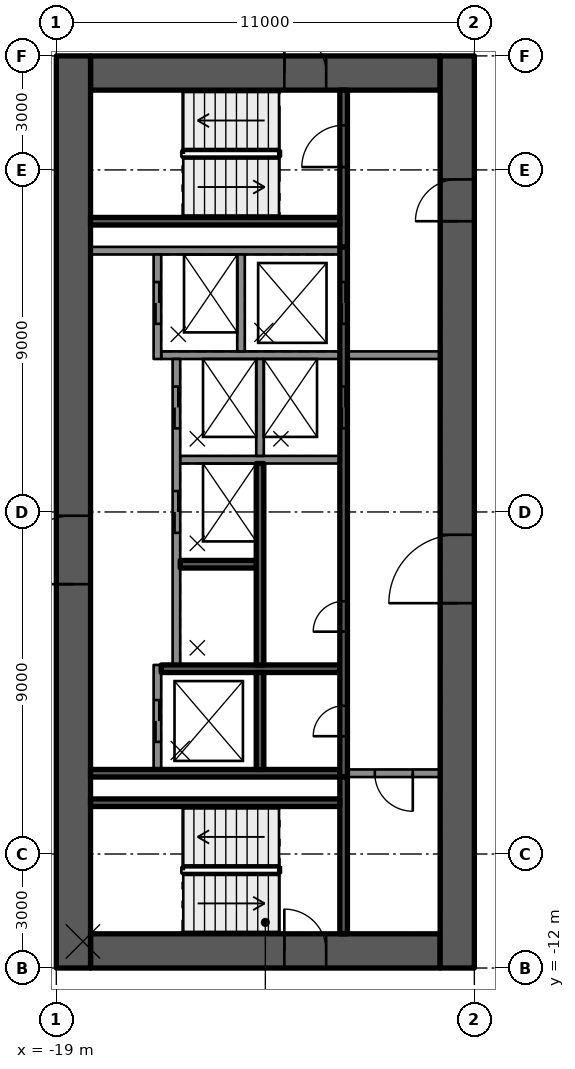
"""IFC4 building model, lengths in metres.
Left out: names, types, materials, properties, quantities, classifications, styles, units other than length and angle.
Written with IfcOpenShell. Run it as: python <this file> out.ifc"""

import sys

from ifc_helpers import new_model, si_unit, direction, frame, frame_2d, origin, place, context, subcontext, project, spatial, rectangle, extrude, element, fill, save


model = new_model("IFC4")
c1 = context("Model", 3, precision=1e-05, world=origin(), true_north=direction((0.0, 1.0)))
c2 = subcontext(c1, "Body", "Model", "MODEL_VIEW")
j1 = project(units=[si_unit("LENGTHUNIT", "METRE"), si_unit("PLANEANGLEUNIT", "RADIAN")], contexts=[c1])
p1 = place(None, origin())
s1 = spatial("IfcSite", under=j1, at=p1, CompositionType="ELEMENT")
p2 = place(p1, origin())
s2 = spatial("IfcBuilding", under=s1, at=p2, CompositionType="ELEMENT")
p3 = place(p2, frame((0.0, 0.0, 199.1)))
s3 = spatial("IfcBuildingStorey", under=s2, at=p3, CompositionType="ELEMENT", Elevation=199.1)
p4 = place(p3, frame((-18.1, 11.55, 0.0), z_axis=(0.0, 0.0, 1.0), x_axis=(1.0, 0.0, 0.0)))
e1 = element("IfcWall", 1, at=p4, inside=s3, PredefinedType="SHEAR", context=c2, shape_type="SweptSolid", body=[
    extrude(rectangle(XDim=9.2, YDim=0.9, at=frame_2d((4.6, 0.0))), origin(), (0.0, 0.0, 1.0), 3.5),
])
p5 = place(p4, frame((5.1, 0.0, 0.0)))
e2 = element("IfcOpeningElement", 2, at=p5, cuts=e1, PredefinedType="OPENING", context=c2, shape_type="SweptSolid", body=[
    extrude(rectangle(XDim=1.1, YDim=2.1, at=frame_2d((0.55, 1.05))), frame((0.0, 0.46, 0.0), z_axis=(0.0, -1.0, 0.0), x_axis=(1.0, 0.0, 0.0)), (0.0, 0.0, 1.0), 0.92),
])
p6 = place(p3, frame((-18.1, -11.55, 0.0), z_axis=(0.0, 0.0, 1.0), x_axis=(1.0, 0.0, 0.0)))
e3 = element("IfcWall", 3, at=p6, inside=s3, PredefinedType="SHEAR", context=c2, shape_type="SweptSolid", body=[
    extrude(rectangle(XDim=9.2, YDim=0.9, at=frame_2d((4.6, 0.0))), origin(), (0.0, 0.0, 1.0), 3.5),
])
p7 = place(p6, frame((5.1, 0.0, 0.0)))
e4 = element("IfcOpeningElement", 4, at=p7, cuts=e3, PredefinedType="OPENING", context=c2, shape_type="SweptSolid", body=[
    extrude(rectangle(XDim=1.1, YDim=2.1, at=frame_2d((0.55, 1.05))), frame((0.0, 0.46, 0.0), z_axis=(0.0, -1.0, 0.0), x_axis=(1.0, 0.0, 0.0)), (0.0, 0.0, 1.0), 0.92),
])
p8 = place(p3, frame((-18.55, -12.0, 0.0), z_axis=(0.0, 0.0, 1.0), x_axis=(0.0, 1.0, 0.0)))
e5 = element("IfcWall", 5, at=p8, inside=s3, PredefinedType="SHEAR", context=c2, shape_type="SweptSolid", body=[
    extrude(rectangle(XDim=24.0, YDim=0.9, at=frame_2d((12.0, 0.0))), origin(), (0.0, 0.0, 1.0), 3.5),
])
p9 = place(p8, frame((10.1, 0.0, 0.0)))
e6 = element("IfcOpeningElement", 6, at=p9, cuts=e5, PredefinedType="OPENING", context=c2, shape_type="SweptSolid", body=[
    extrude(rectangle(XDim=1.8, YDim=2.1, at=frame_2d((0.9, 1.05))), frame((0.0, 0.46, 0.0), z_axis=(0.0, -1.0, 0.0), x_axis=(1.0, 0.0, 0.0)), (0.0, 0.0, 1.0), 0.92),
])
p10 = place(p3, frame((-8.45, -12.0, 0.0), z_axis=(0.0, 0.0, 1.0), x_axis=(0.0, 1.0, 0.0)))
e7 = element("IfcWall", 7, at=p10, inside=s3, PredefinedType="SHEAR", context=c2, shape_type="SweptSolid", body=[
    extrude(rectangle(XDim=24.0, YDim=0.9, at=frame_2d((12.0, 0.0))), origin(), (0.0, 0.0, 1.0), 3.5),
])
p11 = place(p10, frame((9.6, 0.0, 0.0)))
e8 = element("IfcOpeningElement", 8, at=p11, cuts=e7, PredefinedType="OPENING", context=c2, shape_type="SweptSolid", body=[
    extrude(rectangle(XDim=1.8, YDim=2.1, at=frame_2d((0.9, 1.05))), frame((0.0, 0.46, 0.0), z_axis=(0.0, -1.0, 0.0), x_axis=(1.0, 0.0, 0.0)), (0.0, 0.0, 1.0), 0.92),
])
p12 = place(p10, frame((19.65, 0.0, 0.0)))
e9 = element("IfcOpeningElement", 9, at=p12, cuts=e7, PredefinedType="OPENING", context=c2, shape_type="SweptSolid", body=[
    extrude(rectangle(XDim=1.1, YDim=2.1, at=frame_2d((0.55, 1.05))), frame((0.0, 0.46, 0.0), z_axis=(0.0, -1.0, 0.0), x_axis=(1.0, 0.0, 0.0)), (0.0, 0.0, 1.0), 0.92),
])
for number, where, z_axis, x_axis in (
    (10, (-11.54, 6.875, 0.0), (0.0, 0.0, 1.0), (-1.0, 0.0, 0.0)),
    (11, (-11.54, -6.875, 0.0), (0.0, 0.0, 1.0), (-1.0, 0.0, 0.0)),
):
    element("IfcWall", number, at=place(p3, frame(where, z_axis=z_axis, x_axis=x_axis)), inside=s3, PredefinedType="SOLIDWALL", context=c2, shape_type="SweptSolid", body=[
        extrude(rectangle(XDim=6.56, YDim=0.2, at=frame_2d((3.28, 0.0))), origin(), (0.0, 0.0, 1.0), 3.08),
    ])
p13 = place(p3, frame((-11.54, -4.125, 0.0), z_axis=(0.0, 0.0, 1.0), x_axis=(-1.0, 0.0, 0.0)))
e12 = element("IfcWall", 12, at=p13, inside=s3, PredefinedType="SOLIDWALL", context=c2, shape_type="SweptSolid", body=[
    extrude(rectangle(XDim=4.7, YDim=0.2, at=frame_2d((2.35, 0.0))), origin(), (0.0, 0.0, 1.0), 3.08),
])
p14 = place(p3, frame((-13.74, -1.375, 0.0), z_axis=(0.0, 0.0, 1.0), x_axis=(-1.0, 0.0, 0.0)))
e13 = element("IfcWall", 13, at=p14, inside=s3, PredefinedType="SOLIDWALL", context=c2, shape_type="SweptSolid", body=[
    extrude(rectangle(XDim=2.0, YDim=0.2, at=frame_2d((1.0, 0.0))), origin(), (0.0, 0.0, 1.0), 3.08),
])
p15 = place(p3, frame((-11.54, 1.375, 0.0), z_axis=(0.0, 0.0, 1.0), x_axis=(-1.0, 0.0, 0.0)))
e14 = element("IfcWall", 14, at=p15, inside=s3, PredefinedType="SOLIDWALL", context=c2, shape_type="SweptSolid", body=[
    extrude(rectangle(XDim=4.2, YDim=0.2, at=frame_2d((2.1, 0.0))), origin(), (0.0, 0.0, 1.0), 3.08),
])
p16 = place(p3, frame((-11.54, 4.125, 0.0), z_axis=(0.0, 0.0, 1.0), x_axis=(-1.0, 0.0, 0.0)))
e15 = element("IfcWall", 15, at=p16, inside=s3, PredefinedType="SOLIDWALL", context=c2, shape_type="SweptSolid", body=[
    extrude(rectangle(XDim=4.7, YDim=0.2, at=frame_2d((2.35, 0.0))), origin(), (0.0, 0.0, 1.0), 3.08),
])
p17 = place(p3, frame((-11.44, -6.975, 0.0), z_axis=(0.0, 0.0, 1.0), x_axis=(0.0, 1.0, 0.0)))
e16 = element("IfcWall", 16, at=p17, inside=s3, PredefinedType="SOLIDWALL", context=c2, shape_type="SweptSolid", body=[
    extrude(rectangle(XDim=13.95, YDim=0.2, at=frame_2d((6.975, 0.0))), origin(), (0.0, 0.0, 1.0), 3.08),
])
p18 = place(p17, frame((9.175, 0.0, 0.0)))
e17 = element("IfcOpeningElement", 17, at=p18, cuts=e16, PredefinedType="OPENING", context=c2, shape_type="SweptSolid", body=[
    extrude(rectangle(XDim=1.1, YDim=2.1, at=frame_2d((0.55, 1.05))), frame((0.0, 0.11, 0.0), z_axis=(0.0, -1.0, 0.0), x_axis=(1.0, 0.0, 0.0)), (0.0, 0.0, 1.0), 0.22),
])
p19 = place(p17, frame((11.925, 0.0, 0.0)))
e18 = element("IfcOpeningElement", 18, at=p19, cuts=e16, PredefinedType="OPENING", context=c2, shape_type="SweptSolid", body=[
    extrude(rectangle(XDim=1.1, YDim=2.1, at=frame_2d((0.55, 1.05))), frame((0.0, 0.11, 0.0), z_axis=(0.0, -1.0, 0.0), x_axis=(1.0, 0.0, 0.0)), (0.0, 0.0, 1.0), 0.22),
])
p20 = place(p17, frame((1.075, 0.0, 0.0)))
e19 = element("IfcOpeningElement", 19, at=p20, cuts=e16, PredefinedType="OPENING", context=c2, shape_type="SweptSolid", body=[
    extrude(rectangle(XDim=0.8, YDim=2.1, at=frame_2d((0.4, 1.05))), frame((0.0, 0.11, 0.0), z_axis=(0.0, -1.0, 0.0), x_axis=(1.0, 0.0, 0.0)), (0.0, 0.0, 1.0), 0.22),
])
p21 = place(p17, frame((3.825, 0.0, 0.0)))
e20 = element("IfcOpeningElement", 20, at=p21, cuts=e16, PredefinedType="OPENING", context=c2, shape_type="SweptSolid", body=[
    extrude(rectangle(XDim=0.8, YDim=2.1, at=frame_2d((0.4, 1.05))), frame((0.0, 0.11, 0.0), z_axis=(0.0, -1.0, 0.0), x_axis=(1.0, 0.0, 0.0)), (0.0, 0.0, 1.0), 0.22),
])
p22 = place(p3, frame((-13.64, -6.775, 0.0), z_axis=(0.0, 0.0, 1.0), x_axis=(0.0, 1.0, 0.0)))
e21 = element("IfcWall", 21, at=p22, inside=s3, PredefinedType="SOLIDWALL", context=c2, shape_type="SweptSolid", body=[
    extrude(rectangle(XDim=2.55, YDim=0.2, at=frame_2d((1.275, 0.0))), origin(), (0.0, 0.0, 1.0), 3.08),
])
p23 = place(p3, frame((-13.64, -4.025, 0.0), z_axis=(0.0, 0.0, 1.0), x_axis=(0.0, 1.0, 0.0)))
e22 = element("IfcWall", 22, at=p23, inside=s3, PredefinedType="SOLIDWALL", context=c2, shape_type="SweptSolid", body=[
    extrude(rectangle(XDim=5.3, YDim=0.2, at=frame_2d((2.65, 0.0))), origin(), (0.0, 0.0, 1.0), 3.08),
])
for number, where, z_axis, x_axis in (
    (23, (-13.64, 1.475, 0.0), (0.0, 0.0, 1.0), (0.0, 1.0, 0.0)),
    (24, (-14.14, 4.225, 0.0), (0.0, 0.0, 1.0), (0.0, 1.0, 0.0)),
):
    element("IfcWall", number, at=place(p3, frame(where, z_axis=z_axis, x_axis=x_axis)), inside=s3, PredefinedType="SOLIDWALL", context=c2, shape_type="SweptSolid", body=[
        extrude(rectangle(XDim=2.55, YDim=0.2, at=frame_2d((1.275, 0.0))), origin(), (0.0, 0.0, 1.0), 3.08),
    ])
p24 = place(p3, frame((-16.34, -6.775, 0.0), z_axis=(0.0, 0.0, 1.0), x_axis=(0.0, 1.0, 0.0)))
e25 = element("IfcWall", 25, at=p24, inside=s3, PredefinedType="SOLIDWALL", context=c2, shape_type="SweptSolid", body=[
    extrude(rectangle(XDim=2.75, YDim=0.2, at=frame_2d((1.375, 0.0))), origin(), (0.0, 0.0, 1.0), 3.08),
])
p25 = place(p24, frame((0.725, 0.0, 0.0)))
e26 = element("IfcOpeningElement", 26, at=p25, cuts=e25, PredefinedType="OPENING", context=c2, shape_type="SweptSolid", body=[
    extrude(rectangle(XDim=1.1, YDim=2.1, at=frame_2d((0.55, 1.05))), frame((0.0, 0.11, 0.0), z_axis=(0.0, -1.0, 0.0), x_axis=(1.0, 0.0, 0.0)), (0.0, 0.0, 1.0), 0.22),
])
p26 = place(p3, frame((-15.84, -4.025, 0.0), z_axis=(0.0, 0.0, 1.0), x_axis=(0.0, 1.0, 0.0)))
e27 = element("IfcWall", 27, at=p26, inside=s3, PredefinedType="SOLIDWALL", context=c2, shape_type="SweptSolid", body=[
    extrude(rectangle(XDim=8.05, YDim=0.2, at=frame_2d((4.025, 0.0))), origin(), (0.0, 0.0, 1.0), 3.08),
])
p27 = place(p26, frame((3.475, 0.0, 0.0)))
e28 = element("IfcOpeningElement", 28, at=p27, cuts=e27, PredefinedType="OPENING", context=c2, shape_type="SweptSolid", body=[
    extrude(rectangle(XDim=1.1, YDim=2.1, at=frame_2d((0.55, 1.05))), frame((0.0, 0.11, 0.0), z_axis=(0.0, -1.0, 0.0), x_axis=(1.0, 0.0, 0.0)), (0.0, 0.0, 1.0), 0.22),
])
p28 = place(p26, frame((6.225, 0.0, 0.0)))
e29 = element("IfcOpeningElement", 29, at=p28, cuts=e27, PredefinedType="OPENING", context=c2, shape_type="SweptSolid", body=[
    extrude(rectangle(XDim=1.1, YDim=2.1, at=frame_2d((0.55, 1.05))), frame((0.0, 0.11, 0.0), z_axis=(0.0, -1.0, 0.0), x_axis=(1.0, 0.0, 0.0)), (0.0, 0.0, 1.0), 0.22),
])
p29 = place(p3, frame((-16.34, 4.025, 0.0), z_axis=(0.0, 0.0, 1.0), x_axis=(0.0, 1.0, 0.0)))
e30 = element("IfcWall", 30, at=p29, inside=s3, PredefinedType="SOLIDWALL", context=c2, shape_type="SweptSolid", body=[
    extrude(rectangle(XDim=2.75, YDim=0.2, at=frame_2d((1.375, 0.0))), origin(), (0.0, 0.0, 1.0), 3.08),
])
p30 = place(p29, frame((0.925, 0.0, 0.0)))
e31 = element("IfcOpeningElement", 31, at=p30, cuts=e30, PredefinedType="OPENING", context=c2, shape_type="SweptSolid", body=[
    extrude(rectangle(XDim=1.1, YDim=2.1, at=frame_2d((0.55, 1.05))), frame((0.0, 0.11, 0.0), z_axis=(0.0, -1.0, 0.0), x_axis=(1.0, 0.0, 0.0)), (0.0, 0.0, 1.0), 0.22),
])
p31 = place(p3, frame((-11.44, 6.975, 0.0), z_axis=(0.0, 0.0, 1.0), x_axis=(0.0, 1.0, 0.0)))
e32 = element("IfcWall", 32, at=p31, inside=s3, PredefinedType="SOLIDWALL", context=c2, shape_type="SweptSolid", body=[
    extrude(rectangle(XDim=4.125, YDim=0.2, at=frame_2d((2.062, 0.0))), origin(), (0.0, 0.0, 1.0), 3.08),
])
p32 = place(p31, frame((2.1, 0.0, 0.0)))
e33 = element("IfcOpeningElement", 33, at=p32, cuts=e32, PredefinedType="OPENING", context=c2, shape_type="SweptSolid", body=[
    extrude(rectangle(XDim=1.1, YDim=2.1, at=frame_2d((0.55, 1.05))), frame((0.0, 0.11, 0.0), z_axis=(0.0, -1.0, 0.0), x_axis=(1.0, 0.0, 0.0)), (0.0, 0.0, 1.0), 0.22),
])
p33 = place(p3, frame((-11.54, 7.65, 0.0), z_axis=(0.0, 0.0, 1.0), x_axis=(-1.0, 0.0, 0.0)))
e34 = element("IfcWall", 34, at=p33, inside=s3, PredefinedType="SOLIDWALL", context=c2, shape_type="SweptSolid", body=[
    extrude(rectangle(XDim=6.56, YDim=0.2, at=frame_2d((3.28, 0.0))), origin(), (0.0, 0.0, 1.0), 3.08),
])
p34 = place(p3, frame((-11.44, -11.1, 0.0), z_axis=(0.0, 0.0, 1.0), x_axis=(0.0, 1.0, 0.0)))
e35 = element("IfcWall", 35, at=p34, inside=s3, PredefinedType="SOLIDWALL", context=c2, shape_type="SweptSolid", body=[
    extrude(rectangle(XDim=4.125, YDim=0.2, at=frame_2d((2.062, 0.0))), origin(), (0.0, 0.0, 1.0), 3.08),
])
p35 = place(p3, frame((-11.54, -7.65, 0.0), z_axis=(0.0, 0.0, 1.0), x_axis=(-1.0, 0.0, 0.0)))
e36 = element("IfcWall", 36, at=p35, inside=s3, PredefinedType="SOLIDWALL", context=c2, shape_type="SweptSolid", body=[
    extrude(rectangle(XDim=6.56, YDim=0.2, at=frame_2d((3.28, 0.0))), origin(), (0.0, 0.0, 1.0), 3.08),
])
p36 = place(p3, frame((-8.9, 4.125, 0.0), z_axis=(0.0, 0.0, 1.0), x_axis=(-1.0, 0.0, 0.0)))
e37 = element("IfcWall", 37, at=p36, inside=s3, PredefinedType="PARTITIONING", context=c2, shape_type="SweptSolid", body=[
    extrude(rectangle(XDim=2.44, YDim=0.2, at=frame_2d((1.22, 0.0))), origin(), (0.0, 0.0, 1.0), 3.08),
])
p37 = place(p3, frame((-8.9, -6.875, 0.0), z_axis=(0.0, 0.0, 1.0), x_axis=(-1.0, 0.0, 0.0)))
e38 = element("IfcWall", 38, at=p37, inside=s3, PredefinedType="PARTITIONING", context=c2, shape_type="SweptSolid", body=[
    extrude(rectangle(XDim=2.44, YDim=0.2, at=frame_2d((1.22, 0.0))), origin(), (0.0, 0.0, 1.0), 3.08),
])
p38 = place(p37, frame((0.72, 0.0, 0.0)))
e39 = element("IfcOpeningElement", 39, at=p38, cuts=e38, PredefinedType="OPENING", context=c2, shape_type="SweptSolid", body=[
    extrude(rectangle(XDim=1.0, YDim=2.1, at=frame_2d((0.5, 1.05))), frame((0.0, 0.11, 0.0), z_axis=(0.0, -1.0, 0.0), x_axis=(1.0, 0.0, 0.0)), (0.0, 0.0, 1.0), 0.22),
])
p39 = place(p25, origin())
e40 = element("IfcDoor", 40, at=p39, inside=s3, OperationType="DOUBLE_DOOR_SLIDING", PredefinedType="DOOR", context=c2, shape_type="SweptSolid", body=[
    extrude(rectangle(XDim=1.1, YDim=2.1, at=frame_2d((0.55, 1.05))), frame((0.0, 0.025, 0.0), z_axis=(0.0, -1.0, 0.0), x_axis=(1.0, 0.0, 0.0)), (0.0, 0.0, 1.0), 0.05),
])
fill(e26, e40)
p40 = place(p27, origin())
e41 = element("IfcDoor", 41, at=p40, inside=s3, OperationType="DOUBLE_DOOR_SLIDING", PredefinedType="DOOR", context=c2, shape_type="SweptSolid", body=[
    extrude(rectangle(XDim=1.1, YDim=2.1, at=frame_2d((0.55, 1.05))), frame((0.0, 0.025, 0.0), z_axis=(0.0, -1.0, 0.0), x_axis=(1.0, 0.0, 0.0)), (0.0, 0.0, 1.0), 0.05),
])
fill(e28, e41)
p41 = place(p18, origin())
e42 = element("IfcDoor", 42, at=p41, inside=s3, OperationType="DOUBLE_DOOR_SLIDING", PredefinedType="DOOR", context=c2, shape_type="SweptSolid", body=[
    extrude(rectangle(XDim=1.1, YDim=2.1, at=frame_2d((0.55, 1.05))), frame((0.0, 0.025, 0.0), z_axis=(0.0, -1.0, 0.0), x_axis=(1.0, 0.0, 0.0)), (0.0, 0.0, 1.0), 0.05),
])
fill(e17, e42)
p42 = place(p28, origin())
e43 = element("IfcDoor", 43, at=p42, inside=s3, OperationType="DOUBLE_DOOR_SLIDING", PredefinedType="DOOR", context=c2, shape_type="SweptSolid", body=[
    extrude(rectangle(XDim=1.1, YDim=2.1, at=frame_2d((0.55, 1.05))), frame((0.0, 0.025, 0.0), z_axis=(0.0, -1.0, 0.0), x_axis=(1.0, 0.0, 0.0)), (0.0, 0.0, 1.0), 0.05),
])
fill(e29, e43)
p43 = place(p19, origin())
e44 = element("IfcDoor", 44, at=p43, inside=s3, OperationType="DOUBLE_DOOR_SLIDING", PredefinedType="DOOR", context=c2, shape_type="SweptSolid", body=[
    extrude(rectangle(XDim=1.1, YDim=2.1, at=frame_2d((0.55, 1.05))), frame((0.0, 0.025, 0.0), z_axis=(0.0, -1.0, 0.0), x_axis=(1.0, 0.0, 0.0)), (0.0, 0.0, 1.0), 0.05),
])
fill(e18, e44)
p44 = place(p30, origin())
e45 = element("IfcDoor", 45, at=p44, inside=s3, OperationType="DOUBLE_DOOR_SLIDING", PredefinedType="DOOR", context=c2, shape_type="SweptSolid", body=[
    extrude(rectangle(XDim=1.1, YDim=2.1, at=frame_2d((0.55, 1.05))), frame((0.0, 0.025, 0.0), z_axis=(0.0, -1.0, 0.0), x_axis=(1.0, 0.0, 0.0)), (0.0, 0.0, 1.0), 0.05),
])
fill(e31, e45)
p45 = place(p20, origin())
e46 = element("IfcDoor", 46, at=p45, inside=s3, OperationType="SINGLE_SWING_LEFT", PredefinedType="DOOR", context=c2, shape_type="SweptSolid", body=[
    extrude(rectangle(XDim=0.8, YDim=2.1, at=frame_2d((0.4, 1.05))), frame((0.0, 0.025, 0.0), z_axis=(0.0, -1.0, 0.0), x_axis=(1.0, 0.0, 0.0)), (0.0, 0.0, 1.0), 0.05),
])
fill(e19, e46)
p46 = place(p21, origin())
e47 = element("IfcDoor", 47, at=p46, inside=s3, OperationType="SINGLE_SWING_LEFT", PredefinedType="DOOR", context=c2, shape_type="SweptSolid", body=[
    extrude(rectangle(XDim=0.8, YDim=2.1, at=frame_2d((0.4, 1.05))), frame((0.0, 0.025, 0.0), z_axis=(0.0, -1.0, 0.0), x_axis=(1.0, 0.0, 0.0)), (0.0, 0.0, 1.0), 0.05),
])
fill(e20, e47)
p47 = place(p11, origin())
e48 = element("IfcDoor", 48, at=p47, inside=s3, OperationType="SINGLE_SWING_LEFT", PredefinedType="DOOR", context=c2, shape_type="SweptSolid", body=[
    extrude(rectangle(XDim=1.8, YDim=2.1, at=frame_2d((0.9, 1.05))), frame((0.0, 0.025, 0.0), z_axis=(0.0, -1.0, 0.0), x_axis=(1.0, 0.0, 0.0)), (0.0, 0.0, 1.0), 0.05),
])
fill(e8, e48)
p48 = place(p9, origin())
e49 = element("IfcDoor", 49, at=p48, inside=s3, OperationType="SINGLE_SWING_LEFT", PredefinedType="DOOR", context=c2, shape_type="SweptSolid", body=[
    extrude(rectangle(XDim=1.8, YDim=2.1, at=frame_2d((0.9, 1.05))), frame((0.0, 0.025, 0.0), z_axis=(0.0, -1.0, 0.0), x_axis=(1.0, 0.0, 0.0)), (0.0, 0.0, 1.0), 0.05),
])
fill(e6, e49)
p49 = place(p12, origin())
e50 = element("IfcDoor", 50, at=p49, inside=s3, OperationType="SINGLE_SWING_RIGHT", PredefinedType="DOOR", context=c2, shape_type="SweptSolid", body=[
    extrude(rectangle(XDim=1.1, YDim=2.1, at=frame_2d((0.55, 1.05))), frame((0.0, 0.025, 0.0), z_axis=(0.0, -1.0, 0.0), x_axis=(1.0, 0.0, 0.0)), (0.0, 0.0, 1.0), 0.05),
])
fill(e9, e50)
p50 = place(p5, origin())
e51 = element("IfcDoor", 51, at=p50, inside=s3, OperationType="SINGLE_SWING_RIGHT", PredefinedType="DOOR", context=c2, shape_type="SweptSolid", body=[
    extrude(rectangle(XDim=1.1, YDim=2.1, at=frame_2d((0.55, 1.05))), frame((0.0, 0.025, 0.0), z_axis=(0.0, -1.0, 0.0), x_axis=(1.0, 0.0, 0.0)), (0.0, 0.0, 1.0), 0.05),
])
fill(e2, e51)
p51 = place(p7, origin())
e52 = element("IfcDoor", 52, at=p51, inside=s3, OperationType="SINGLE_SWING_RIGHT", PredefinedType="DOOR", context=c2, shape_type="SweptSolid", body=[
    extrude(rectangle(XDim=1.1, YDim=2.1, at=frame_2d((0.55, 1.05))), frame((0.0, 0.025, 0.0), z_axis=(0.0, -1.0, 0.0), x_axis=(1.0, 0.0, 0.0)), (0.0, 0.0, 1.0), 0.05),
])
fill(e4, e52)
p52 = place(p32, origin())
e53 = element("IfcDoor", 53, at=p52, inside=s3, OperationType="SINGLE_SWING_RIGHT", PredefinedType="DOOR", context=c2, shape_type="SweptSolid", body=[
    extrude(rectangle(XDim=1.1, YDim=2.1, at=frame_2d((0.55, 1.05))), frame((0.0, 0.025, 0.0), z_axis=(0.0, -1.0, 0.0), x_axis=(1.0, 0.0, 0.0)), (0.0, 0.0, 1.0), 0.05),
])
fill(e33, e53)
p53 = place(p38, origin())
e54 = element("IfcDoor", 54, at=p53, inside=s3, OperationType="SINGLE_SWING_RIGHT", PredefinedType="DOOR", context=c2, shape_type="SweptSolid", body=[
    extrude(rectangle(XDim=1.0, YDim=2.1, at=frame_2d((0.5, 1.05))), frame((0.0, 0.025, 0.0), z_axis=(0.0, -1.0, 0.0), x_axis=(1.0, 0.0, 0.0)), (0.0, 0.0, 1.0), 0.05),
])
fill(e39, e54)
save(model, sys.argv[1])
